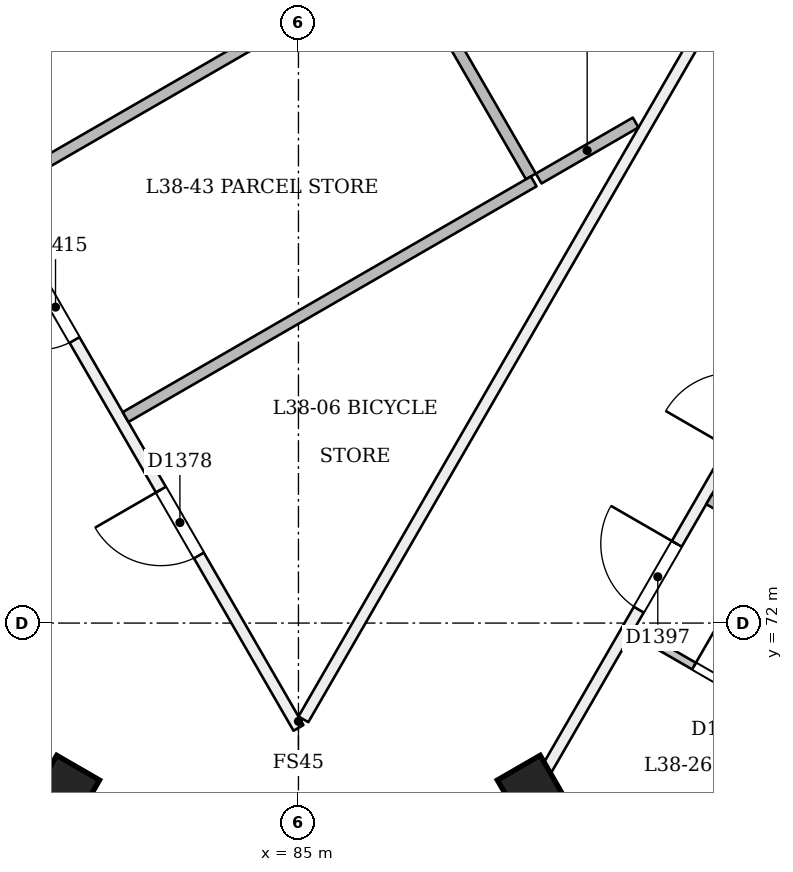
"""IFC4 building model, lengths in metres.
Left out: names, types, materials, properties, quantities, classifications, styles, units other than length and angle.
Written with IfcOpenShell. Run it as: python <this file> out.ifc"""

import sys

from ifc_helpers import new_model, si_unit, direction, frame, frame_2d, origin, origin_2d, place, context, subcontext, project, spatial, rectangle, extrude, element, fill, save


model = new_model("IFC4")
c1 = context("Model", 3, precision=1e-05, world=origin(), true_north=direction((0.0, 1.0)))
c2 = subcontext(c1, "Body", "Model", "MODEL_VIEW")
j1 = project(units=[si_unit("LENGTHUNIT", "METRE"), si_unit("PLANEANGLEUNIT", "RADIAN")], contexts=[c1])
p1 = place(None, origin())
s1 = spatial("IfcSite", under=j1, at=p1, CompositionType="ELEMENT")
p2 = place(p1, origin())
s2 = spatial("IfcBuilding", under=s1, at=p2, CompositionType="ELEMENT")
p3 = place(p2, frame((0.0, 0.0, 149.4)))
s3 = spatial("IfcBuildingStorey", under=s2, at=p3, CompositionType="ELEMENT", Elevation=149.4)
for number, where, z_axis, x_axis in (
    (1, (81.912, 69.769, -0.02), (0.022, 0.038, 0.999), (-0.866, -0.499, 0.038)),
    (2, (88.088, 69.769, -0.02), (-0.022, 0.038, 0.999), (-0.5, -0.866, 0.022)),
):
    element("IfcColumn", number, at=place(p3, frame(where, z_axis=z_axis, x_axis=x_axis)), inside=s3, PredefinedType="COLUMN", context=c2, shape_type="SweptSolid", body=[
        extrude(rectangle(XDim=0.65, YDim=0.65, at=origin_2d()), origin(), (0.0, 0.0, 1.0), 3.604),
    ])
p4 = place(p3, frame((96.304, 90.2, 0.0), z_axis=(0.0, 0.0, 1.0), x_axis=(-0.500004509943, -0.866022799952, 0.0)))
e3 = element("IfcWall", 3, at=p4, inside=s3, PredefinedType="PARTITIONING", context=c2, shape_type="SweptSolid", body=[
    extrude(rectangle(XDim=22.478, YDim=0.15, at=frame_2d((11.239, 0.0))), origin(), (0.0, 0.0, 1.0), 3.15),
])
p5 = place(p4, frame((10.96, 0.0, 0.0)))
e4 = element("IfcOpeningElement", 4, at=p5, cuts=e3, PredefinedType="OPENING", context=c2, shape_type="SweptSolid", body=[
    extrude(rectangle(XDim=1.0, YDim=2.1, at=frame_2d((0.5, 1.05))), frame((0.0, 0.085, 0.0), z_axis=(0.0, -1.0, 0.0), x_axis=(1.0, 0.0, 0.0)), (0.0, 0.0, 1.0), 0.171),
])
p6 = place(p4, frame((5.447, 0.0, 0.0)))
e5 = element("IfcOpeningElement", 5, at=p6, cuts=e3, PredefinedType="OPENING", context=c2, shape_type="SweptSolid", body=[
    extrude(rectangle(XDim=1.0, YDim=2.1, at=frame_2d((0.5, 1.05))), frame((0.0, 0.085, 0.0), z_axis=(0.0, -1.0, 0.0), x_axis=(1.0, 0.0, 0.0)), (0.0, 0.0, 1.0), 0.171),
])
p7 = place(p3, frame((85.0, 70.621, 0.0), z_axis=(0.0, 0.0, 1.0), x_axis=(-0.500003200507, 0.866023555963, 0.0)))
e6 = element("IfcWall", 6, at=p7, inside=s3, PredefinedType="PARTITIONING", context=c2, shape_type="SweptSolid", body=[
    extrude(rectangle(XDim=22.608, YDim=0.15, at=frame_2d((11.304, 0.0))), origin(), (0.0, 0.0, 1.0), 3.15),
])
p8 = place(p7, frame((12.79, 0.0, 0.0)))
e7 = element("IfcOpeningElement", 7, at=p8, cuts=e6, PredefinedType="OPENING", context=c2, shape_type="SweptSolid", body=[
    extrude(rectangle(XDim=0.9, YDim=2.1, at=frame_2d((0.45, 1.05))), frame((0.0, 0.085, 0.0), z_axis=(0.0, -1.0, 0.0), x_axis=(1.0, 0.0, 0.0)), (0.0, 0.0, 1.0), 0.171),
])
p9 = place(p7, frame((19.298, 0.0, 0.0)))
e8 = element("IfcOpeningElement", 8, at=p9, cuts=e6, PredefinedType="OPENING", context=c2, shape_type="SweptSolid", body=[
    extrude(rectangle(XDim=0.9, YDim=2.1, at=frame_2d((0.45, 1.05))), frame((0.0, 0.085, 0.0), z_axis=(0.0, -1.0, 0.0), x_axis=(1.0, 0.0, 0.0)), (0.0, 0.0, 1.0), 0.171),
])
p10 = place(p7, frame((2.619, 0.0, 0.0)))
e9 = element("IfcOpeningElement", 9, at=p10, cuts=e6, PredefinedType="OPENING", context=c2, shape_type="SweptSolid", body=[
    extrude(rectangle(XDim=1.0, YDim=2.1, at=frame_2d((0.5, 1.05))), frame((0.0, 0.085, 0.0), z_axis=(0.0, -1.0, 0.0), x_axis=(1.0, 0.0, 0.0)), (0.0, 0.0, 1.0), 0.171),
])
p11 = place(p7, frame((16.21, 0.0, 0.0)))
e10 = element("IfcOpeningElement", 10, at=p11, cuts=e6, PredefinedType="OPENING", context=c2, shape_type="SweptSolid", body=[
    extrude(rectangle(XDim=1.0, YDim=2.1, at=frame_2d((0.5, 1.05))), frame((0.0, 0.085, 0.0), z_axis=(0.0, -1.0, 0.0), x_axis=(1.0, 0.0, 0.0)), (0.0, 0.0, 1.0), 0.171),
])
p12 = place(p7, frame((9.246, 0.0, 0.0)))
e11 = element("IfcOpeningElement", 11, at=p12, cuts=e6, PredefinedType="OPENING", context=c2, shape_type="SweptSolid", body=[
    extrude(rectangle(XDim=1.0, YDim=2.1, at=frame_2d((0.5, 1.05))), frame((0.0, 0.085, 0.0), z_axis=(0.0, -1.0, 0.0), x_axis=(1.0, 0.0, 0.0)), (0.0, 0.0, 1.0), 0.171),
])
p13 = place(p7, frame((5.892, 0.0, 0.0)))
e12 = element("IfcOpeningElement", 12, at=p13, cuts=e6, PredefinedType="OPENING", context=c2, shape_type="SweptSolid", body=[
    extrude(rectangle(XDim=1.0, YDim=2.1, at=frame_2d((0.5, 1.05))), frame((0.0, 0.085, 0.0), z_axis=(0.0, -1.0, 0.0), x_axis=(1.0, 0.0, 0.0)), (0.0, 0.0, 1.0), 0.171),
])
p14 = place(p3, frame((65.324, 98.5, 0.0), z_axis=(0.0, 0.0, 1.0), x_axis=(0.500001898363, -0.866024307761, 0.0)))
e13 = element("IfcWall", 13, at=p14, inside=s3, PredefinedType="PARTITIONING", context=c2, shape_type="SweptSolid", body=[
    extrude(rectangle(XDim=39.351, YDim=0.15, at=frame_2d((19.675, 0.0))), origin(), (0.0, 0.0, 1.0), 2.75),
])
p15 = place(p14, frame((0.2, 0.0, 0.0)))
e14 = element("IfcOpeningElement", 14, at=p15, cuts=e13, PredefinedType="OPENING", context=c2, shape_type="SweptSolid", body=[
    extrude(rectangle(XDim=1.2, YDim=2.1, at=frame_2d((0.6, 1.05))), frame((0.0, 0.085, 0.0), z_axis=(0.0, -1.0, 0.0), x_axis=(1.0, 0.0, 0.0)), (0.0, 0.0, 1.0), 0.171),
])
p16 = place(p14, frame((3.425, 0.0, 0.0)))
e15 = element("IfcOpeningElement", 15, at=p16, cuts=e13, PredefinedType="OPENING", context=c2, shape_type="SweptSolid", body=[
    extrude(rectangle(XDim=1.0, YDim=2.1, at=frame_2d((0.5, 1.05))), frame((0.0, 0.085, 0.0), z_axis=(0.0, -1.0, 0.0), x_axis=(1.0, 0.0, 0.0)), (0.0, 0.0, 1.0), 0.171),
])
p17 = place(p14, frame((9.004, 0.0, 0.0)))
e16 = element("IfcOpeningElement", 16, at=p17, cuts=e13, PredefinedType="OPENING", context=c2, shape_type="SweptSolid", body=[
    extrude(rectangle(XDim=1.1, YDim=2.1, at=frame_2d((0.55, 1.05))), frame((0.0, 0.085, 0.0), z_axis=(0.0, -1.0, 0.0), x_axis=(1.0, 0.0, 0.0)), (0.0, 0.0, 1.0), 0.171),
])
p18 = place(p14, frame((11.396, 0.0, 0.0)))
e17 = element("IfcOpeningElement", 17, at=p18, cuts=e13, PredefinedType="OPENING", context=c2, shape_type="SweptSolid", body=[
    extrude(rectangle(XDim=1.0, YDim=2.1, at=frame_2d((0.5, 1.05))), frame((0.0, 0.085, 0.0), z_axis=(0.0, -1.0, 0.0), x_axis=(1.0, 0.0, 0.0)), (0.0, 0.0, 1.0), 0.171),
])
p19 = place(p14, frame((17.955, 0.0, 0.0)))
e18 = element("IfcOpeningElement", 18, at=p19, cuts=e13, PredefinedType="OPENING", context=c2, shape_type="SweptSolid", body=[
    extrude(rectangle(XDim=1.0, YDim=2.1, at=frame_2d((0.5, 1.05))), frame((0.0, 0.085, 0.0), z_axis=(0.0, -1.0, 0.0), x_axis=(1.0, 0.0, 0.0)), (0.0, 0.0, 1.0), 0.171),
])
p20 = place(p14, frame((20.396, 0.0, 0.0)))
e19 = element("IfcOpeningElement", 19, at=p20, cuts=e13, PredefinedType="OPENING", context=c2, shape_type="SweptSolid", body=[
    extrude(rectangle(XDim=1.0, YDim=2.1, at=frame_2d((0.5, 1.05))), frame((0.0, 0.085, 0.0), z_axis=(0.0, -1.0, 0.0), x_axis=(1.0, 0.0, 0.0)), (0.0, 0.0, 1.0), 0.171),
])
p21 = place(p14, frame((26.955, 0.0, 0.0)))
e20 = element("IfcOpeningElement", 20, at=p21, cuts=e13, PredefinedType="OPENING", context=c2, shape_type="SweptSolid", body=[
    extrude(rectangle(XDim=1.0, YDim=2.1, at=frame_2d((0.5, 1.05))), frame((0.0, 0.085, 0.0), z_axis=(0.0, -1.0, 0.0), x_axis=(1.0, 0.0, 0.0)), (0.0, 0.0, 1.0), 0.171),
])
p22 = place(p14, frame((29.396, 0.0, 0.0)))
e21 = element("IfcOpeningElement", 21, at=p22, cuts=e13, PredefinedType="OPENING", context=c2, shape_type="SweptSolid", body=[
    extrude(rectangle(XDim=1.0, YDim=2.1, at=frame_2d((0.5, 1.05))), frame((0.0, 0.085, 0.0), z_axis=(0.0, -1.0, 0.0), x_axis=(1.0, 0.0, 0.0)), (0.0, 0.0, 1.0), 0.171),
])
p23 = place(p14, frame((36.004, 0.0, 0.0)))
e22 = element("IfcOpeningElement", 22, at=p23, cuts=e13, PredefinedType="OPENING", context=c2, shape_type="SweptSolid", body=[
    extrude(rectangle(XDim=1.1, YDim=2.1, at=frame_2d((0.55, 1.05))), frame((0.0, 0.085, 0.0), z_axis=(0.0, -1.0, 0.0), x_axis=(1.0, 0.0, 0.0)), (0.0, 0.0, 1.0), 0.171),
])
p24 = place(p3, frame((85.065, 64.534, 0.0), z_axis=(0.0, 0.0, 1.0), x_axis=(0.500002644497, 0.866023876978, 0.0)))
e23 = element("IfcWall", 23, at=p24, inside=s3, PredefinedType="PARTITIONING", context=c2, shape_type="SweptSolid", body=[
    extrude(rectangle(XDim=39.221, YDim=0.15, at=frame_2d((19.61, 0.0))), origin(), (0.0, 0.0, 1.0), 2.75),
])
p25 = place(p24, frame((0.506, 0.0, 0.0)))
e24 = element("IfcOpeningElement", 24, at=p25, cuts=e23, PredefinedType="OPENING", context=c2, shape_type="SweptSolid", body=[
    extrude(rectangle(XDim=1.2, YDim=2.1, at=frame_2d((0.6, 1.05))), frame((0.0, 0.085, 0.0), z_axis=(0.0, -1.0, 0.0), x_axis=(1.0, 0.0, 0.0)), (0.0, 0.0, 1.0), 0.171),
])
p26 = place(p24, frame((8.825, 0.0, 0.0)))
e25 = element("IfcOpeningElement", 25, at=p26, cuts=e23, PredefinedType="OPENING", context=c2, shape_type="SweptSolid", body=[
    extrude(rectangle(XDim=1.0, YDim=2.1, at=frame_2d((0.5, 1.05))), frame((0.0, 0.085, 0.0), z_axis=(0.0, -1.0, 0.0), x_axis=(1.0, 0.0, 0.0)), (0.0, 0.0, 1.0), 0.171),
])
p27 = place(p24, frame((11.266, 0.0, 0.0)))
e26 = element("IfcOpeningElement", 26, at=p27, cuts=e23, PredefinedType="OPENING", context=c2, shape_type="SweptSolid", body=[
    extrude(rectangle(XDim=1.0, YDim=2.1, at=frame_2d((0.5, 1.05))), frame((0.0, 0.085, 0.0), z_axis=(0.0, -1.0, 0.0), x_axis=(1.0, 0.0, 0.0)), (0.0, 0.0, 1.0), 0.171),
])
p28 = place(p24, frame((17.825, 0.0, 0.0)))
e27 = element("IfcOpeningElement", 27, at=p28, cuts=e23, PredefinedType="OPENING", context=c2, shape_type="SweptSolid", body=[
    extrude(rectangle(XDim=1.0, YDim=2.1, at=frame_2d((0.5, 1.05))), frame((0.0, 0.085, 0.0), z_axis=(0.0, -1.0, 0.0), x_axis=(1.0, 0.0, 0.0)), (0.0, 0.0, 1.0), 0.171),
])
p29 = place(p24, frame((20.266, 0.0, 0.0)))
e28 = element("IfcOpeningElement", 28, at=p29, cuts=e23, PredefinedType="OPENING", context=c2, shape_type="SweptSolid", body=[
    extrude(rectangle(XDim=1.0, YDim=2.1, at=frame_2d((0.5, 1.05))), frame((0.0, 0.085, 0.0), z_axis=(0.0, -1.0, 0.0), x_axis=(1.0, 0.0, 0.0)), (0.0, 0.0, 1.0), 0.171),
])
p30 = place(p24, frame((26.825, 0.0, 0.0)))
e29 = element("IfcOpeningElement", 29, at=p30, cuts=e23, PredefinedType="OPENING", context=c2, shape_type="SweptSolid", body=[
    extrude(rectangle(XDim=1.0, YDim=2.1, at=frame_2d((0.5, 1.05))), frame((0.0, 0.085, 0.0), z_axis=(0.0, -1.0, 0.0), x_axis=(1.0, 0.0, 0.0)), (0.0, 0.0, 1.0), 0.171),
])
p31 = place(p24, frame((30.296, 0.0, 0.0)))
e30 = element("IfcOpeningElement", 30, at=p31, cuts=e23, PredefinedType="OPENING", context=c2, shape_type="SweptSolid", body=[
    extrude(rectangle(XDim=1.0, YDim=2.1, at=frame_2d((0.5, 1.05))), frame((0.0, 0.085, 0.0), z_axis=(0.0, -1.0, 0.0), x_axis=(1.0, 0.0, 0.0)), (0.0, 0.0, 1.0), 0.171),
])
p32 = place(p24, frame((35.875, 0.0, 0.0)))
e31 = element("IfcOpeningElement", 31, at=p32, cuts=e23, PredefinedType="OPENING", context=c2, shape_type="SweptSolid", body=[
    extrude(rectangle(XDim=1.1, YDim=2.1, at=frame_2d((0.55, 1.05))), frame((0.0, 0.085, 0.0), z_axis=(0.0, -1.0, 0.0), x_axis=(1.0, 0.0, 0.0)), (0.0, 0.0, 1.0), 0.171),
])
p33 = place(p24, frame((37.821, 0.0, 0.0)))
e32 = element("IfcOpeningElement", 32, at=p33, cuts=e23, PredefinedType="OPENING", context=c2, shape_type="SweptSolid", body=[
    extrude(rectangle(XDim=1.2, YDim=2.1, at=frame_2d((0.6, 1.05))), frame((0.0, 0.085, 0.0), z_axis=(0.0, -1.0, 0.0), x_axis=(1.0, 0.0, 0.0)), (0.0, 0.0, 1.0), 0.171),
])
p34 = place(p3, frame((88.16, 77.848, 0.0), z_axis=(0.0, 0.0, 1.0), x_axis=(0.86604208752, 0.499971101808, 0.0)))
e33 = element("IfcWall", 33, at=p34, inside=s3, PredefinedType="PARTITIONING", context=c2, shape_type="SweptSolid", body=[
    extrude(rectangle(XDim=1.473, YDim=0.15, at=frame_2d((0.737, 0.0))), origin(), (0.0, 0.0, 1.0), 3.15),
])
p35 = place(p3, frame((86.42, 80.713, 0.0), z_axis=(0.0, 0.0, 1.0), x_axis=(0.500010613097, -0.866019276224, 0.0)))
e34 = element("IfcWall", 34, at=p35, inside=s3, PredefinedType="PARTITIONING", context=c2, shape_type="SweptSolid", body=[
    extrude(rectangle(XDim=3.276, YDim=0.15, at=frame_2d((1.638, 0.0))), origin(), (0.0, 0.0, 1.0), 3.15),
])
p36 = place(p3, frame((88.095, 77.811, 0.0), z_axis=(0.0, 0.0, 1.0), x_axis=(-0.866022320763, -0.500005339912, 0.0)))
e35 = element("IfcWall", 35, at=p36, inside=s3, PredefinedType="PARTITIONING", context=c2, shape_type="SweptSolid", body=[
    extrude(rectangle(XDim=6.201, YDim=0.15, at=frame_2d((3.1, 0.0))), origin(), (0.0, 0.0, 1.0), 3.15),
])
p37 = place(p3, frame((89.403, 71.897, 0.0), z_axis=(0.0, 0.0, 1.0), x_axis=(0.866048868473, -0.499959355765, 0.0)))
e36 = element("IfcWall", 36, at=p37, inside=s3, PredefinedType="PARTITIONING", context=c2, shape_type="SweptSolid", body=[
    extrude(rectangle(XDim=2.825, YDim=0.1, at=frame_2d((1.413, 0.0))), origin(), (0.0, 0.0, 1.0), 3.15),
])
p38 = place(p37, frame((0.925, 0.0, 0.0)))
e37 = element("IfcOpeningElement", 37, at=p38, cuts=e36, PredefinedType="OPENING", context=c2, shape_type="SweptSolid", body=[
    extrude(rectangle(XDim=0.9, YDim=2.1, at=frame_2d((0.45, 1.05))), frame((0.0, 0.061, 0.0), z_axis=(0.0, -1.0, 0.0), x_axis=(1.0, 0.0, 0.0)), (0.0, 0.0, 1.0), 0.121),
])
p39 = place(p3, frame((95.898, 70.456, 0.0), z_axis=(0.0, 0.0, 1.0), x_axis=(-0.866025401434, 0.500000004071, 0.0)))
e38 = element("IfcWall", 38, at=p39, inside=s3, PredefinedType="PARTITIONING", context=c2, shape_type="SweptSolid", body=[
    extrude(rectangle(XDim=6.345, YDim=0.15, at=frame_2d((3.173, 0.0))), origin(), (0.0, 0.0, 1.0), 2.65),
])
p40 = place(p3, frame((81.013, 77.677, 0.0), z_axis=(0.0, 0.0, 1.0), x_axis=(0.866022320763, 0.500005339912, 0.0)))
e39 = element("IfcWall", 39, at=p40, inside=s3, PredefinedType="PARTITIONING", context=c2, shape_type="SweptSolid", body=[
    extrude(rectangle(XDim=6.201, YDim=0.15, at=frame_2d((3.1, 0.0))), origin(), (0.0, 0.0, 1.0), 3.15),
])
p41 = place(p10, origin())
e40 = element("IfcDoor", 40, at=p41, inside=s3, OperationType="SINGLE_SWING_RIGHT", PredefinedType="NOTDEFINED", context=c2, shape_type="SweptSolid", body=[
    extrude(rectangle(XDim=1.0, YDim=2.1, at=frame_2d((0.5, 1.05))), frame((0.0, 0.025, 0.0), z_axis=(0.0, -1.0, 0.0), x_axis=(1.0, 0.0, 0.0)), (0.0, 0.0, 1.0), 0.05),
])
fill(e9, e40)
p42 = place(p26, origin())
e41 = element("IfcDoor", 41, at=p42, inside=s3, OperationType="SINGLE_SWING_RIGHT", PredefinedType="NOTDEFINED", context=c2, shape_type="SweptSolid", body=[
    extrude(rectangle(XDim=1.0, YDim=2.1, at=frame_2d((0.5, 1.05))), frame((0.0, 0.025, 0.0), z_axis=(0.0, -1.0, 0.0), x_axis=(1.0, 0.0, 0.0)), (0.0, 0.0, 1.0), 0.05),
])
fill(e25, e41)
p43 = place(p38, origin())
e42 = element("IfcDoor", 42, at=p43, inside=s3, OperationType="SINGLE_SWING_LEFT", PredefinedType="NOTDEFINED", context=c2, shape_type="SweptSolid", body=[
    extrude(rectangle(XDim=0.9, YDim=2.1, at=frame_2d((0.45, 1.05))), frame((0.0, 0.025, 0.0), z_axis=(0.0, -1.0, 0.0), x_axis=(1.0, 0.0, 0.0)), (0.0, 0.0, 1.0), 0.05),
])
fill(e37, e42)
p44 = place(p13, origin())
e43 = element("IfcDoor", 43, at=p44, inside=s3, OperationType="SINGLE_SWING_RIGHT", PredefinedType="NOTDEFINED", context=c2, shape_type="SweptSolid", body=[
    extrude(rectangle(XDim=1.0, YDim=2.1, at=frame_2d((0.5, 1.05))), frame((0.0, 0.025, 0.0), z_axis=(0.0, -1.0, 0.0), x_axis=(1.0, 0.0, 0.0)), (0.0, 0.0, 1.0), 0.05),
])
fill(e12, e43)
save(model, sys.argv[1])
